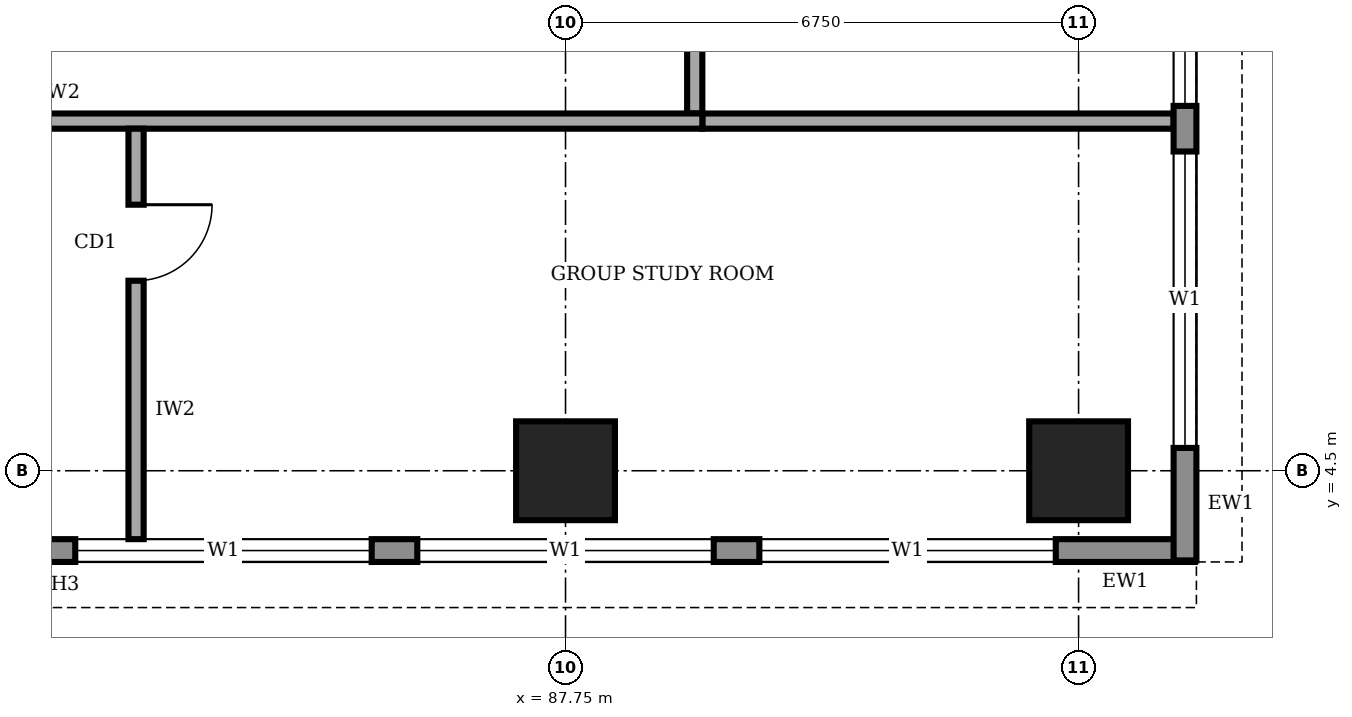
"""IFC4 building model, lengths in metres.
Left out: names, types, materials, properties, quantities, classifications, styles, units other than length and angle.
Written with IfcOpenShell. Run it as: python <this file> out.ifc"""

import sys

from ifc_helpers import new_model, si_unit, direction, frame, frame_2d, origin, origin_2d, place, context, subcontext, project, spatial, rectangle, extrude, element, fill, save


model = new_model("IFC4")
c1 = context("Model", 3, precision=1e-05, world=origin(), true_north=direction((0.0, 1.0)))
c2 = subcontext(c1, "Body", "Model", "MODEL_VIEW")
j1 = project(units=[si_unit("LENGTHUNIT", "METRE"), si_unit("PLANEANGLEUNIT", "RADIAN")], contexts=[c1])
p1 = place(None, origin())
s1 = spatial("IfcSite", under=j1, at=p1, CompositionType="ELEMENT")
p2 = place(p1, origin())
s2 = spatial("IfcBuilding", under=s1, at=p2, CompositionType="ELEMENT")
p3 = place(p2, frame((0.0, 0.0, 221.0)))
s3 = spatial("IfcBuildingStorey", under=s2, at=p3, CompositionType="ELEMENT", Elevation=221.0)
for number, where, z_axis, x_axis in (
    (1, (87.75, 4.5, 0.0), (0.0, 0.0, 1.0), (1.0, 0.0, 0.0)),
    (2, (94.5, 4.5, 0.0), (0.0, 0.0, 1.0), (1.0, 0.0, 0.0)),
):
    element("IfcColumn", number, at=place(p3, frame(where, z_axis=z_axis, x_axis=x_axis)), inside=s3, PredefinedType="COLUMN", context=c2, shape_type="SweptSolid", body=[
        extrude(rectangle(XDim=1.3, YDim=1.3, at=origin_2d()), origin(), (0.0, 0.0, 1.0), 4.0),
    ])
p4 = place(p3, frame((66.12, 3.45, 0.0), z_axis=(0.0, 0.0, 1.0), x_axis=(1.0, 0.0, 0.0)))
e3 = element("IfcWall", 3, at=p4, inside=s3, PredefinedType="STANDARD", context=c2, shape_type="SweptSolid", body=[
    extrude(rectangle(XDim=29.91, YDim=0.3, at=frame_2d((14.955, 0.0))), origin(), (0.0, 0.0, 1.0), 3.75),
])
p5 = place(p4, frame((1.68, 0.0, 0.9)))
e4 = element("IfcOpeningElement", 4, at=p5, cuts=e3, PredefinedType="OPENING", context=c2, shape_type="SweptSolid", body=[
    extrude(rectangle(XDim=3.9, YDim=2.2, at=frame_2d((1.95, 1.1))), frame((0.0, 0.16, 0.0), z_axis=(0.0, -1.0, 0.0), x_axis=(1.0, 0.0, 0.0)), (0.0, 0.0, 1.0), 0.32),
])
p6 = place(p4, frame((6.18, 0.0, 0.9)))
e5 = element("IfcOpeningElement", 5, at=p6, cuts=e3, PredefinedType="OPENING", context=c2, shape_type="SweptSolid", body=[
    extrude(rectangle(XDim=3.9, YDim=2.2, at=frame_2d((1.95, 1.1))), frame((0.0, 0.16, 0.0), z_axis=(0.0, -1.0, 0.0), x_axis=(1.0, 0.0, 0.0)), (0.0, 0.0, 1.0), 0.32),
])
p7 = place(p4, frame((10.68, 0.0, 0.9)))
e6 = element("IfcOpeningElement", 6, at=p7, cuts=e3, PredefinedType="OPENING", context=c2, shape_type="SweptSolid", body=[
    extrude(rectangle(XDim=3.9, YDim=2.2, at=frame_2d((1.95, 1.1))), frame((0.0, 0.16, 0.0), z_axis=(0.0, -1.0, 0.0), x_axis=(1.0, 0.0, 0.0)), (0.0, 0.0, 1.0), 0.32),
])
p8 = place(p4, frame((15.18, 0.0, 0.9)))
e7 = element("IfcOpeningElement", 7, at=p8, cuts=e3, PredefinedType="OPENING", context=c2, shape_type="SweptSolid", body=[
    extrude(rectangle(XDim=3.9, YDim=2.2, at=frame_2d((1.95, 1.1))), frame((0.0, 0.16, 0.0), z_axis=(0.0, -1.0, 0.0), x_axis=(1.0, 0.0, 0.0)), (0.0, 0.0, 1.0), 0.32),
])
p9 = place(p4, frame((19.68, 0.0, 0.9)))
e8 = element("IfcOpeningElement", 8, at=p9, cuts=e3, PredefinedType="OPENING", context=c2, shape_type="SweptSolid", body=[
    extrude(rectangle(XDim=3.9, YDim=2.2, at=frame_2d((1.95, 1.1))), frame((0.0, 0.16, 0.0), z_axis=(0.0, -1.0, 0.0), x_axis=(1.0, 0.0, 0.0)), (0.0, 0.0, 1.0), 0.32),
])
p10 = place(p4, frame((24.18, 0.0, 0.9)))
e9 = element("IfcOpeningElement", 9, at=p10, cuts=e3, PredefinedType="OPENING", context=c2, shape_type="SweptSolid", body=[
    extrude(rectangle(XDim=3.9, YDim=2.2, at=frame_2d((1.95, 1.1))), frame((0.0, 0.16, 0.0), z_axis=(0.0, -1.0, 0.0), x_axis=(1.0, 0.0, 0.0)), (0.0, 0.0, 1.0), 0.32),
])
p11 = place(p3, frame((95.9, 3.32, 0.0), z_axis=(0.0, 0.0, 1.0), x_axis=(0.0, 1.0, 0.0)))
e10 = element("IfcWall", 10, at=p11, inside=s3, PredefinedType="STANDARD", context=c2, shape_type="SweptSolid", body=[
    extrude(rectangle(XDim=33.86, YDim=0.3, at=frame_2d((16.93, 0.0))), origin(), (0.0, 0.0, 1.0), 3.75),
])
p12 = place(p11, frame((1.48, 0.0, 0.9)))
e11 = element("IfcOpeningElement", 11, at=p12, cuts=e10, PredefinedType="OPENING", context=c2, shape_type="SweptSolid", body=[
    extrude(rectangle(XDim=3.9, YDim=2.2, at=frame_2d((1.95, 1.1))), frame((0.0, 0.16, 0.0), z_axis=(0.0, -1.0, 0.0), x_axis=(1.0, 0.0, 0.0)), (0.0, 0.0, 1.0), 0.32),
])
p13 = place(p11, frame((5.98, 0.0, 0.9)))
e12 = element("IfcOpeningElement", 12, at=p13, cuts=e10, PredefinedType="OPENING", context=c2, shape_type="SweptSolid", body=[
    extrude(rectangle(XDim=3.9, YDim=2.2, at=frame_2d((1.95, 1.1))), frame((0.0, 0.16, 0.0), z_axis=(0.0, -1.0, 0.0), x_axis=(1.0, 0.0, 0.0)), (0.0, 0.0, 1.0), 0.32),
])
p14 = place(p11, frame((10.48, 0.0, 0.9)))
e13 = element("IfcOpeningElement", 13, at=p14, cuts=e10, PredefinedType="OPENING", context=c2, shape_type="SweptSolid", body=[
    extrude(rectangle(XDim=3.9, YDim=2.2, at=frame_2d((1.95, 1.1))), frame((0.0, 0.16, 0.0), z_axis=(0.0, -1.0, 0.0), x_axis=(1.0, 0.0, 0.0)), (0.0, 0.0, 1.0), 0.32),
])
p15 = place(p11, frame((14.98, 0.0, 0.9)))
e14 = element("IfcOpeningElement", 14, at=p15, cuts=e10, PredefinedType="OPENING", context=c2, shape_type="SweptSolid", body=[
    extrude(rectangle(XDim=3.9, YDim=2.2, at=frame_2d((1.95, 1.1))), frame((0.0, 0.16, 0.0), z_axis=(0.0, -1.0, 0.0), x_axis=(1.0, 0.0, 0.0)), (0.0, 0.0, 1.0), 0.32),
])
p16 = place(p11, frame((19.48, 0.0, 0.9)))
e15 = element("IfcOpeningElement", 15, at=p16, cuts=e10, PredefinedType="OPENING", context=c2, shape_type="SweptSolid", body=[
    extrude(rectangle(XDim=3.9, YDim=2.2, at=frame_2d((1.95, 1.1))), frame((0.0, 0.16, 0.0), z_axis=(0.0, -1.0, 0.0), x_axis=(1.0, 0.0, 0.0)), (0.0, 0.0, 1.0), 0.32),
])
p17 = place(p11, frame((23.98, 0.0, 0.9)))
e16 = element("IfcOpeningElement", 16, at=p17, cuts=e10, PredefinedType="OPENING", context=c2, shape_type="SweptSolid", body=[
    extrude(rectangle(XDim=3.9, YDim=2.2, at=frame_2d((1.95, 1.1))), frame((0.0, 0.16, 0.0), z_axis=(0.0, -1.0, 0.0), x_axis=(1.0, 0.0, 0.0)), (0.0, 0.0, 1.0), 0.32),
])
p18 = place(p11, frame((28.48, 0.0, 0.9)))
e17 = element("IfcOpeningElement", 17, at=p18, cuts=e10, PredefinedType="OPENING", context=c2, shape_type="SweptSolid", body=[
    extrude(rectangle(XDim=3.9, YDim=2.2, at=frame_2d((1.95, 1.1))), frame((0.0, 0.16, 0.0), z_axis=(0.0, -1.0, 0.0), x_axis=(1.0, 0.0, 0.0)), (0.0, 0.0, 1.0), 0.32),
])
p19 = place(p3, frame((72.65, 9.1, 0.0), z_axis=(0.0, 0.0, 1.0), x_axis=(1.0, 0.0, 0.0)))
e18 = element("IfcWall", 18, at=p19, inside=s3, PredefinedType="SOLIDWALL", context=c2, shape_type="SweptSolid", body=[
    extrude(rectangle(XDim=16.9, YDim=0.2, at=frame_2d((8.45, 0.0))), origin(), (0.0, 0.0, 1.0), 3.75),
])
p20 = place(p3, frame((89.45, 9.2, 0.0), z_axis=(0.0, 0.0, 1.0), x_axis=(0.0, 1.0, 0.0)))
e19 = element("IfcWall", 19, at=p20, inside=s3, PredefinedType="SOLIDWALL", context=c2, shape_type="SweptSolid", body=[
    extrude(rectangle(XDim=23.8, YDim=0.2, at=frame_2d((11.9, 0.0))), origin(), (0.0, 0.0, 1.0), 3.75),
])
p21 = place(p20, frame((1.55, 0.0, 0.0)))
e20 = element("IfcOpeningElement", 20, at=p21, cuts=e19, PredefinedType="OPENING", context=c2, shape_type="SweptSolid", body=[
    extrude(rectangle(XDim=1.0, YDim=2.1, at=frame_2d((0.5, 1.05))), frame((0.0, 0.11, 0.0), z_axis=(0.0, -1.0, 0.0), x_axis=(1.0, 0.0, 0.0)), (0.0, 0.0, 1.0), 0.22),
])
p22 = place(p20, frame((4.9, 0.0, 0.0)))
e21 = element("IfcOpeningElement", 21, at=p22, cuts=e19, PredefinedType="OPENING", context=c2, shape_type="SweptSolid", body=[
    extrude(rectangle(XDim=1.0, YDim=2.1, at=frame_2d((0.5, 1.05))), frame((0.0, 0.11, 0.0), z_axis=(0.0, -1.0, 0.0), x_axis=(1.0, 0.0, 0.0)), (0.0, 0.0, 1.0), 0.22),
])
p23 = place(p20, frame((8.0, 0.0, 0.0)))
e22 = element("IfcOpeningElement", 22, at=p23, cuts=e19, PredefinedType="OPENING", context=c2, shape_type="SweptSolid", body=[
    extrude(rectangle(XDim=0.9, YDim=2.1, at=frame_2d((0.45, 1.05))), frame((0.0, 0.11, 0.0), z_axis=(0.0, -1.0, 0.0), x_axis=(1.0, 0.0, 0.0)), (0.0, 0.0, 1.0), 0.22),
])
p24 = place(p20, frame((11.05, 0.0, 0.0)))
e23 = element("IfcOpeningElement", 23, at=p24, cuts=e19, PredefinedType="OPENING", context=c2, shape_type="SweptSolid", body=[
    extrude(rectangle(XDim=0.9, YDim=2.1, at=frame_2d((0.45, 1.05))), frame((0.0, 0.11, 0.0), z_axis=(0.0, -1.0, 0.0), x_axis=(1.0, 0.0, 0.0)), (0.0, 0.0, 1.0), 0.22),
])
p25 = place(p20, frame((15.75, 0.0, 0.0)))
e24 = element("IfcOpeningElement", 24, at=p25, cuts=e19, PredefinedType="OPENING", context=c2, shape_type="SweptSolid", body=[
    extrude(rectangle(XDim=0.9, YDim=2.1, at=frame_2d((0.45, 1.05))), frame((0.0, 0.11, 0.0), z_axis=(0.0, -1.0, 0.0), x_axis=(1.0, 0.0, 0.0)), (0.0, 0.0, 1.0), 0.22),
])
p26 = place(p20, frame((13.1, 0.0, 0.0)))
e25 = element("IfcOpeningElement", 25, at=p26, cuts=e19, PredefinedType="OPENING", context=c2, shape_type="SweptSolid", body=[
    extrude(rectangle(XDim=1.0, YDim=2.1, at=frame_2d((0.5, 1.05))), frame((0.0, 0.11, 0.0), z_axis=(0.0, -1.0, 0.0), x_axis=(1.0, 0.0, 0.0)), (0.0, 0.0, 1.0), 0.22),
])
p27 = place(p20, frame((20.3, 0.0, 0.0)))
e26 = element("IfcOpeningElement", 26, at=p27, cuts=e19, PredefinedType="OPENING", context=c2, shape_type="SweptSolid", body=[
    extrude(rectangle(XDim=1.0, YDim=2.1, at=frame_2d((0.5, 1.05))), frame((0.0, 0.11, 0.0), z_axis=(0.0, -1.0, 0.0), x_axis=(1.0, 0.0, 0.0)), (0.0, 0.0, 1.0), 0.22),
])
p28 = place(p3, frame((82.1, 9.0, 0.0), z_axis=(0.0, 0.0, 1.0), x_axis=(0.0, -1.0, 0.0)))
e27 = element("IfcWall", 27, at=p28, inside=s3, PredefinedType="SOLIDWALL", context=c2, shape_type="SweptSolid", body=[
    extrude(rectangle(XDim=5.4, YDim=0.2, at=frame_2d((2.7, 0.0))), origin(), (0.0, 0.0, 1.0), 3.75),
])
p29 = place(p28, frame((1.0, 0.0, 0.0)))
e28 = element("IfcOpeningElement", 28, at=p29, cuts=e27, PredefinedType="OPENING", context=c2, shape_type="SweptSolid", body=[
    extrude(rectangle(XDim=1.0, YDim=2.1, at=frame_2d((0.5, 1.05))), frame((0.0, 0.11, 0.0), z_axis=(0.0, -1.0, 0.0), x_axis=(1.0, 0.0, 0.0)), (0.0, 0.0, 1.0), 0.22),
])
p30 = place(p3, frame((89.55, 9.1, 0.0), z_axis=(0.0, 0.0, 1.0), x_axis=(1.0, 0.0, 0.0)))
e29 = element("IfcWall", 29, at=p30, inside=s3, PredefinedType="SOLIDWALL", context=c2, shape_type="SweptSolid", body=[
    extrude(rectangle(XDim=6.2, YDim=0.2, at=frame_2d((3.1, 0.0))), origin(), (0.0, 0.0, 1.0), 3.75),
])
p31 = place(p8, origin())
e30 = element("IfcWindow", 30, at=p31, inside=s3, PartitioningType="SINGLE_PANEL", PredefinedType="WINDOW", context=c2, shape_type="SweptSolid", body=[
    extrude(rectangle(XDim=3.9, YDim=2.2, at=frame_2d((1.95, 1.1))), frame((0.0, 0.03, 0.0), z_axis=(0.0, -1.0, 0.0), x_axis=(1.0, 0.0, 0.0)), (0.0, 0.0, 1.0), 0.06),
])
fill(e7, e30)
p32 = place(p9, origin())
e31 = element("IfcWindow", 31, at=p32, inside=s3, PartitioningType="SINGLE_PANEL", PredefinedType="WINDOW", context=c2, shape_type="SweptSolid", body=[
    extrude(rectangle(XDim=3.9, YDim=2.2, at=frame_2d((1.95, 1.1))), frame((0.0, 0.03, 0.0), z_axis=(0.0, -1.0, 0.0), x_axis=(1.0, 0.0, 0.0)), (0.0, 0.0, 1.0), 0.06),
])
fill(e8, e31)
p33 = place(p10, origin())
e32 = element("IfcWindow", 32, at=p33, inside=s3, PartitioningType="SINGLE_PANEL", PredefinedType="WINDOW", context=c2, shape_type="SweptSolid", body=[
    extrude(rectangle(XDim=3.9, YDim=2.2, at=frame_2d((1.95, 1.1))), frame((0.0, 0.03, 0.0), z_axis=(0.0, -1.0, 0.0), x_axis=(1.0, 0.0, 0.0)), (0.0, 0.0, 1.0), 0.06),
])
fill(e9, e32)
p34 = place(p12, origin())
e33 = element("IfcWindow", 33, at=p34, inside=s3, PartitioningType="SINGLE_PANEL", PredefinedType="WINDOW", context=c2, shape_type="SweptSolid", body=[
    extrude(rectangle(XDim=3.9, YDim=2.2, at=frame_2d((1.95, 1.1))), frame((0.0, 0.03, 0.0), z_axis=(0.0, -1.0, 0.0), x_axis=(1.0, 0.0, 0.0)), (0.0, 0.0, 1.0), 0.06),
])
fill(e11, e33)
p35 = place(p13, origin())
e34 = element("IfcWindow", 34, at=p35, inside=s3, PartitioningType="SINGLE_PANEL", PredefinedType="WINDOW", context=c2, shape_type="SweptSolid", body=[
    extrude(rectangle(XDim=3.9, YDim=2.2, at=frame_2d((1.95, 1.1))), frame((0.0, 0.03, 0.0), z_axis=(0.0, -1.0, 0.0), x_axis=(1.0, 0.0, 0.0)), (0.0, 0.0, 1.0), 0.06),
])
fill(e12, e34)
p36 = place(p29, origin())
e35 = element("IfcDoor", 35, at=p36, inside=s3, OperationType="SINGLE_SWING_LEFT", PredefinedType="DOOR", context=c2, shape_type="SweptSolid", body=[
    extrude(rectangle(XDim=1.0, YDim=2.1, at=frame_2d((0.5, 1.05))), frame((0.0, 0.025, 0.0), z_axis=(0.0, -1.0, 0.0), x_axis=(1.0, 0.0, 0.0)), (0.0, 0.0, 1.0), 0.05),
])
fill(e28, e35)
save(model, sys.argv[1])
